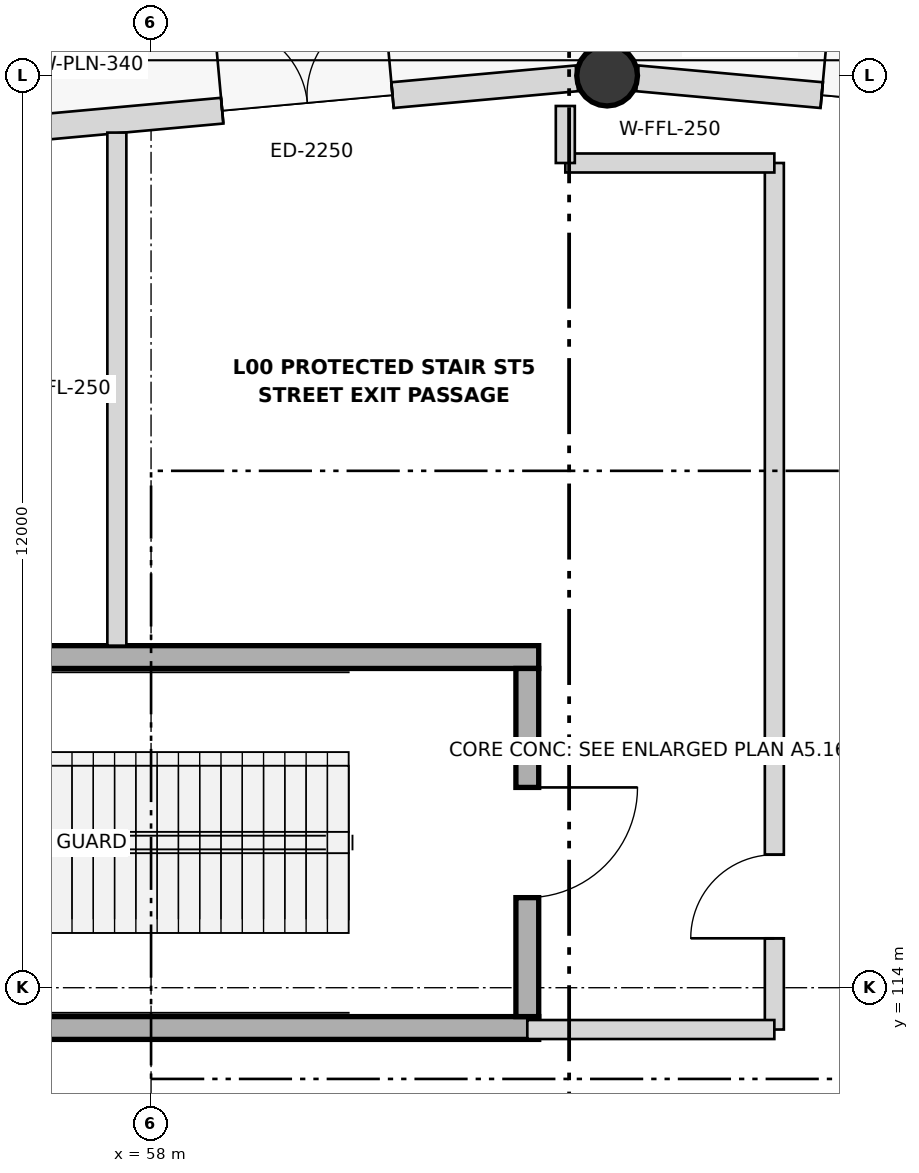
"""IFC4 building model, lengths in metres.
Left out: names, types, materials, properties, quantities, classifications, styles, units other than length and angle.
Written with IfcOpenShell. Run it as: python <this file> out.ifc"""

import sys

from ifc_helpers import new_model, si_unit, direction, frame, frame_2d, origin, origin_2d, place, context, subcontext, project, spatial, rectangle, circle, extrude, element, fill, save


model = new_model("IFC4")
c1 = context("Model", 3, precision=1e-05, world=origin(), true_north=direction((0.0, 1.0)))
c2 = subcontext(c1, "Body", "Model", "MODEL_VIEW")
j1 = project(units=[si_unit("LENGTHUNIT", "METRE"), si_unit("PLANEANGLEUNIT", "RADIAN")], contexts=[c1])
p1 = place(None, origin())
s1 = spatial("IfcSite", under=j1, at=p1, CompositionType="ELEMENT")
p2 = place(p1, origin())
s2 = spatial("IfcBuilding", under=s1, at=p2, CompositionType="ELEMENT")
p3 = place(p2, origin())
s3 = spatial("IfcBuildingStorey", under=s2, at=p3, CompositionType="ELEMENT", Elevation=0.0)
p4 = place(p3, frame((64.0, 126.0, 0.0), z_axis=(0.0, 0.0, 1.0), x_axis=(1.0, 0.0, 0.0)))
e1 = element("IfcColumn", 1, at=p4, inside=s3, PredefinedType="COLUMN", context=c2, shape_type="SweptSolid", body=[
    extrude(circle(Radius=0.4, at=origin_2d()), origin(), (0.0, 0.0, 1.0), 5.4),
])
p5 = place(p3, frame((64.398, 125.964, 0.0), z_axis=(0.0, 0.0, 1.0), x_axis=(0.995865935197, -0.090835230574, 0.0)))
e2 = element("IfcWall", 2, at=p5, inside=s3, PredefinedType="SOLIDWALL", context=c2, shape_type="SweptSolid", body=[
    extrude(rectangle(XDim=12.716, YDim=0.34, at=frame_2d((6.358, 0.0))), origin(), (0.0, 0.0, 1.0), 4.54),
])
p6 = place(p5, frame((2.435, 0.0, 0.0)))
e3 = element("IfcOpeningElement", 3, at=p6, cuts=e2, PredefinedType="OPENING", context=c2, shape_type="SweptSolid", body=[
    extrude(rectangle(XDim=2.25, YDim=2.5, at=frame_2d((1.125, 1.25))), frame((0.0, 0.18, 0.0), z_axis=(0.0, -1.0, 0.0), x_axis=(1.0, 0.0, 0.0)), (0.0, 0.0, 1.0), 0.36),
])
p7 = place(p5, frame((8.03, 0.0, 0.0)))
e4 = element("IfcOpeningElement", 4, at=p7, cuts=e2, PredefinedType="OPENING", context=c2, shape_type="SweptSolid", body=[
    extrude(rectangle(XDim=2.25, YDim=2.5, at=frame_2d((1.125, 1.25))), frame((0.0, 0.18, 0.0), z_axis=(0.0, -1.0, 0.0), x_axis=(1.0, 0.0, 0.0)), (0.0, 0.0, 1.0), 0.36),
])
p8 = place(p3, frame((50.939, 124.809, 0.0), z_axis=(0.0, 0.0, 1.0), x_axis=(0.995865935197, 0.090835230574, 0.0)))
e5 = element("IfcWall", 5, at=p8, inside=s3, PredefinedType="SOLIDWALL", context=c2, shape_type="SweptSolid", body=[
    extrude(rectangle(XDim=12.716, YDim=0.34, at=frame_2d((6.358, 0.0))), origin(), (0.0, 0.0, 1.0), 4.54),
])
p9 = place(p8, frame((2.435, 0.0, 0.0)))
e6 = element("IfcOpeningElement", 6, at=p9, cuts=e5, PredefinedType="OPENING", context=c2, shape_type="SweptSolid", body=[
    extrude(rectangle(XDim=2.25, YDim=2.5, at=frame_2d((1.125, 1.25))), frame((0.0, 0.18, 0.0), z_axis=(0.0, -1.0, 0.0), x_axis=(1.0, 0.0, 0.0)), (0.0, 0.0, 1.0), 0.36),
])
p10 = place(p8, frame((8.03, 0.0, 0.0)))
e7 = element("IfcOpeningElement", 7, at=p10, cuts=e5, PredefinedType="OPENING", context=c2, shape_type="SweptSolid", body=[
    extrude(rectangle(XDim=2.25, YDim=2.5, at=frame_2d((1.125, 1.25))), frame((0.0, 0.18, 0.0), z_axis=(0.0, -1.0, 0.0), x_axis=(1.0, 0.0, 0.0)), (0.0, 0.0, 1.0), 0.36),
])
for number, where, z_axis, x_axis in (
    (8, (63.1, 113.47, 0.0), (0.0, 0.0, 1.0), (-1.0, 0.0, 0.0)),
    (9, (53.9, 118.35, 0.0), (0.0, 0.0, 1.0), (1.0, 0.0, 0.0)),
):
    element("IfcWall", number, at=place(p3, frame(where, z_axis=z_axis, x_axis=x_axis)), inside=s3, PredefinedType="SHEAR", context=c2, shape_type="SweptSolid", body=[
        extrude(rectangle(XDim=9.2, YDim=0.3, at=frame_2d((4.6, 0.0))), origin(), (0.0, 0.0, 1.0), 5.4),
    ])
p11 = place(p3, frame((62.95, 118.2, 0.0), z_axis=(0.0, 0.0, 1.0), x_axis=(0.0, -1.0, 0.0)))
e10 = element("IfcWall", 10, at=p11, inside=s3, PredefinedType="SHEAR", context=c2, shape_type="SweptSolid", body=[
    extrude(rectangle(XDim=4.58, YDim=0.3, at=frame_2d((2.29, 0.0))), origin(), (0.0, 0.0, 1.0), 5.4),
])
p12 = place(p11, frame((1.565, 0.0, 0.0)))
e11 = element("IfcOpeningElement", 11, at=p12, cuts=e10, PredefinedType="OPENING", context=c2, shape_type="SweptSolid", body=[
    extrude(rectangle(XDim=1.45, YDim=2.2, at=frame_2d((0.725, 1.1))), frame((0.0, 0.16, 0.0), z_axis=(0.0, -1.0, 0.0), x_axis=(1.0, 0.0, 0.0)), (0.0, 0.0, 1.0), 0.32),
])
p13 = place(p3, frame((66.2, 113.45, 0.0), z_axis=(0.0, 0.0, 1.0), x_axis=(0.0, 1.0, 0.0)))
e12 = element("IfcWall", 12, at=p13, inside=s3, PredefinedType="PARTITIONING", context=c2, shape_type="SweptSolid", body=[
    extrude(rectangle(XDim=11.4, YDim=0.25, at=frame_2d((5.7, 0.0))), origin(), (0.0, 0.0, 1.0), 4.1),
])
p14 = place(p13, frame((1.2, 0.0, 0.0)))
e13 = element("IfcOpeningElement", 13, at=p14, cuts=e12, PredefinedType="OPENING", context=c2, shape_type="SweptSolid", body=[
    extrude(rectangle(XDim=1.1, YDim=2.15, at=frame_2d((0.55, 1.075))), frame((0.0, 0.135, 0.0), z_axis=(0.0, -1.0, 0.0), x_axis=(1.0, 0.0, 0.0)), (0.0, 0.0, 1.0), 0.27),
])
p15 = place(p3, frame((63.45, 124.85, 0.0), z_axis=(0.0, 0.0, 1.0), x_axis=(1.0, 0.0, 0.0)))
e14 = element("IfcWall", 14, at=p15, inside=s3, PredefinedType="PARTITIONING", context=c2, shape_type="SweptSolid", body=[
    extrude(rectangle(XDim=2.75, YDim=0.25, at=frame_2d((1.375, 0.0))), origin(), (0.0, 0.0, 1.0), 4.1),
])
p16 = place(p3, frame((63.45, 124.85, 0.0), z_axis=(0.0, 0.0, 1.0), x_axis=(0.0, 1.0, 0.0)))
e15 = element("IfcWall", 15, at=p16, inside=s3, PredefinedType="PARTITIONING", context=c2, shape_type="SweptSolid", body=[
    extrude(rectangle(XDim=0.75, YDim=0.25, at=frame_2d((0.375, 0.0))), origin(), (0.0, 0.0, 1.0), 4.1),
])
p17 = place(p3, frame((57.55, 118.5, 0.0), z_axis=(0.0, 0.0, 1.0), x_axis=(0.0, 1.0, 0.0)))
e16 = element("IfcWall", 16, at=p17, inside=s3, PredefinedType="PARTITIONING", context=c2, shape_type="SweptSolid", body=[
    extrude(rectangle(XDim=6.75, YDim=0.25, at=frame_2d((3.375, 0.0))), origin(), (0.0, 0.0, 1.0), 4.1),
])
p18 = place(p3, frame((62.95, 113.45, 0.0), z_axis=(0.0, 0.0, 1.0), x_axis=(1.0, 0.0, 0.0)))
e17 = element("IfcWall", 17, at=p18, inside=s3, PredefinedType="PARTITIONING", context=c2, shape_type="SweptSolid", body=[
    extrude(rectangle(XDim=3.25, YDim=0.25, at=frame_2d((1.625, 0.0))), origin(), (0.0, 0.0, 1.0), 4.1),
])
p19 = place(p6, origin())
e18 = element("IfcDoor", 18, at=p19, inside=s3, OperationType="DOUBLE_DOOR_SINGLE_SWING", PredefinedType="DOOR", context=c2, shape_type="SweptSolid", body=[
    extrude(rectangle(XDim=2.25, YDim=2.5, at=frame_2d((1.125, 1.25))), frame((0.0, 0.025, 0.0), z_axis=(0.0, -1.0, 0.0), x_axis=(1.0, 0.0, 0.0)), (0.0, 0.0, 1.0), 0.05),
])
fill(e3, e18)
p20 = place(p10, origin())
e19 = element("IfcDoor", 19, at=p20, inside=s3, OperationType="DOUBLE_DOOR_SINGLE_SWING", PredefinedType="DOOR", context=c2, shape_type="SweptSolid", body=[
    extrude(rectangle(XDim=2.25, YDim=2.5, at=frame_2d((1.125, 1.25))), frame((0.0, 0.025, 0.0), z_axis=(0.0, -1.0, 0.0), x_axis=(1.0, 0.0, 0.0)), (0.0, 0.0, 1.0), 0.05),
])
fill(e7, e19)
p21 = place(p12, origin())
e20 = element("IfcDoor", 20, at=p21, inside=s3, OperationType="SINGLE_SWING_LEFT", PredefinedType="DOOR", context=c2, shape_type="SweptSolid", body=[
    extrude(rectangle(XDim=1.45, YDim=2.2, at=frame_2d((0.725, 1.1))), frame((0.0, 0.025, 0.0), z_axis=(0.0, -1.0, 0.0), x_axis=(1.0, 0.0, 0.0)), (0.0, 0.0, 1.0), 0.05),
])
fill(e11, e20)
p22 = place(p14, origin())
e21 = element("IfcDoor", 21, at=p22, inside=s3, OperationType="SINGLE_SWING_LEFT", PredefinedType="DOOR", context=c2, shape_type="SweptSolid", body=[
    extrude(rectangle(XDim=1.1, YDim=2.15, at=frame_2d((0.55, 1.075))), frame((0.0, 0.025, 0.0), z_axis=(0.0, -1.0, 0.0), x_axis=(1.0, 0.0, 0.0)), (0.0, 0.0, 1.0), 0.05),
])
fill(e13, e21)
save(model, sys.argv[1])
